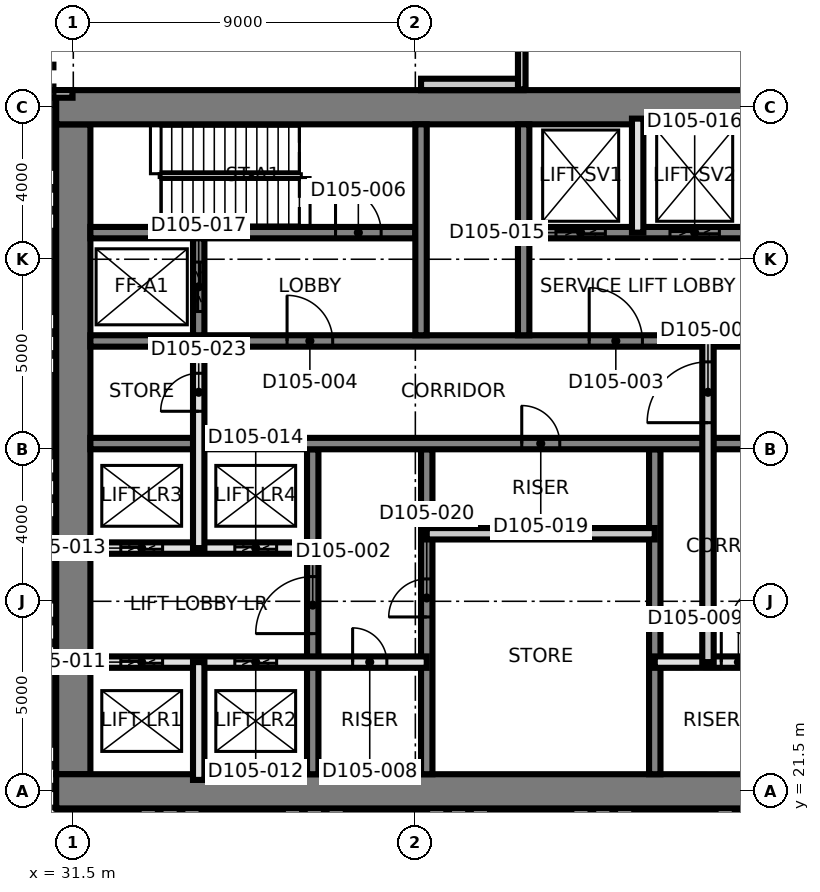
"""IFC4 building model, lengths in metres.
Left out: names, types, materials, properties, quantities, classifications, styles, units other than length and angle.
Written with IfcOpenShell. Run it as: python <this file> out.ifc"""

import sys

from ifc_helpers import new_model, si_unit, direction, frame, frame_2d, origin, place, context, subcontext, project, spatial, rectangle, extrude, element, fill, save


model = new_model("IFC4")
c1 = context("Model", 3, precision=1e-05, world=origin(), true_north=direction((0.0, 1.0)))
c2 = subcontext(c1, "Body", "Model", "MODEL_VIEW")
j1 = project(units=[si_unit("LENGTHUNIT", "METRE"), si_unit("PLANEANGLEUNIT", "RADIAN")], contexts=[c1])
p1 = place(None, origin())
s1 = spatial("IfcSite", under=j1, at=p1, CompositionType="ELEMENT")
p2 = place(p1, origin())
s2 = spatial("IfcBuilding", under=s1, at=p2, CompositionType="ELEMENT")
p3 = place(p2, frame((0.0, 0.0, 18.5)))
s3 = spatial("IfcBuildingStorey", under=s2, at=p3, CompositionType="ELEMENT", Elevation=18.5)
p4 = place(p3, frame((31.5, 21.95, 0.0), z_axis=(0.0, 0.0, 1.0), x_axis=(0.0, 1.0, 0.0)))
e1 = element("IfcWall", 1, at=p4, inside=s3, PredefinedType="SHEAR", context=c2, shape_type="SweptSolid", body=[
    extrude(rectangle(XDim=17.1, YDim=0.9, at=frame_2d((8.55, 0.0))), origin(), (0.0, 0.0, 1.0), 5.0),
])
for number, where, z_axis, x_axis in (
    (2, (31.05, 21.5, 0.0), (0.0, 0.0, 1.0), (1.0, 0.0, 0.0)),
    (3, (31.05, 39.5, 0.0), (0.0, 0.0, 1.0), (1.0, 0.0, 0.0)),
):
    element("IfcWall", number, at=place(p3, frame(where, z_axis=z_axis, x_axis=x_axis)), inside=s3, PredefinedType="SHEAR", context=c2, shape_type="SweptSolid", body=[
        extrude(rectangle(XDim=27.0, YDim=0.9, at=frame_2d((13.5, 0.0))), origin(), (0.0, 0.0, 1.0), 5.0),
    ])
p5 = place(p3, frame((37.8, 21.95, 0.0), z_axis=(0.0, 0.0, 1.0), x_axis=(0.0, 1.0, 0.0)))
e4 = element("IfcWall", 4, at=p5, inside=s3, PredefinedType="SHEAR", context=c2, shape_type="SweptSolid", body=[
    extrude(rectangle(XDim=8.55, YDim=0.3, at=frame_2d((4.275, 0.0))), origin(), (0.0, 0.0, 1.0), 5.0),
])
p6 = place(p5, frame((3.7, 0.0, 0.0)))
e5 = element("IfcOpeningElement", 5, at=p6, cuts=e4, PredefinedType="OPENING", context=c2, shape_type="SweptSolid", body=[
    extrude(rectangle(XDim=1.5, YDim=2.1, at=frame_2d((0.75, 1.05))), frame((0.0, 0.16, 0.0), z_axis=(0.0, -1.0, 0.0), x_axis=(1.0, 0.0, 0.0)), (0.0, 0.0, 1.0), 0.32),
])
p7 = place(p3, frame((40.8, 21.95, 0.0), z_axis=(0.0, 0.0, 1.0), x_axis=(0.0, 1.0, 0.0)))
e6 = element("IfcWall", 6, at=p7, inside=s3, PredefinedType="SHEAR", context=c2, shape_type="SweptSolid", body=[
    extrude(rectangle(XDim=8.55, YDim=0.3, at=frame_2d((4.275, 0.0))), origin(), (0.0, 0.0, 1.0), 5.0),
])
p8 = place(p7, frame((4.138, 0.0, 0.0)))
e7 = element("IfcOpeningElement", 7, at=p8, cuts=e6, PredefinedType="OPENING", context=c2, shape_type="SweptSolid", body=[
    extrude(rectangle(XDim=1.0, YDim=2.1, at=frame_2d((0.5, 1.05))), frame((0.0, 0.16, 0.0), z_axis=(0.0, -1.0, 0.0), x_axis=(1.0, 0.0, 0.0)), (0.0, 0.0, 1.0), 0.32),
])
p9 = place(p3, frame((46.8, 21.95, 0.0), z_axis=(0.0, 0.0, 1.0), x_axis=(0.0, 1.0, 0.0)))
e8 = element("IfcWall", 8, at=p9, inside=s3, PredefinedType="SHEAR", context=c2, shape_type="SweptSolid", body=[
    extrude(rectangle(XDim=8.55, YDim=0.3, at=frame_2d((4.275, 0.0))), origin(), (0.0, 0.0, 1.0), 5.0),
])
p10 = place(p3, frame((31.95, 30.65, 0.0), z_axis=(0.0, 0.0, 1.0), x_axis=(1.0, 0.0, 0.0)))
e9 = element("IfcWall", 9, at=p10, inside=s3, PredefinedType="SHEAR", context=c2, shape_type="SweptSolid", body=[
    extrude(rectangle(XDim=26.1, YDim=0.3, at=frame_2d((13.05, 0.0))), origin(), (0.0, 0.0, 1.0), 5.0),
])
p11 = place(p10, frame((24.55, 0.0, 0.0)))
e10 = element("IfcOpeningElement", 10, at=p11, cuts=e9, PredefinedType="OPENING", context=c2, shape_type="SweptSolid", body=[
    extrude(rectangle(XDim=1.0, YDim=2.1, at=frame_2d((0.5, 1.05))), frame((0.0, 0.16, 0.0), z_axis=(0.0, -1.0, 0.0), x_axis=(1.0, 0.0, 0.0)), (0.0, 0.0, 1.0), 0.32),
])
p12 = place(p10, frame((11.35, 0.0, 0.0)))
e11 = element("IfcOpeningElement", 11, at=p12, cuts=e9, PredefinedType="OPENING", context=c2, shape_type="SweptSolid", body=[
    extrude(rectangle(XDim=1.0, YDim=2.1, at=frame_2d((0.5, 1.05))), frame((0.0, 0.16, 0.0), z_axis=(0.0, -1.0, 0.0), x_axis=(1.0, 0.0, 0.0)), (0.0, 0.0, 1.0), 0.32),
])
p13 = place(p3, frame((31.95, 33.35, 0.0), z_axis=(0.0, 0.0, 1.0), x_axis=(1.0, 0.0, 0.0)))
e12 = element("IfcWall", 12, at=p13, inside=s3, PredefinedType="SHEAR", context=c2, shape_type="SweptSolid", body=[
    extrude(rectangle(XDim=26.1, YDim=0.3, at=frame_2d((13.05, 0.0))), origin(), (0.0, 0.0, 1.0), 5.0),
])
p14 = place(p13, frame((13.125, 0.0, 0.0)))
e13 = element("IfcOpeningElement", 13, at=p14, cuts=e12, PredefinedType="OPENING", context=c2, shape_type="SweptSolid", body=[
    extrude(rectangle(XDim=1.4, YDim=2.1, at=frame_2d((0.7, 1.05))), frame((0.0, 0.16, 0.0), z_axis=(0.0, -1.0, 0.0), x_axis=(1.0, 0.0, 0.0)), (0.0, 0.0, 1.0), 0.32),
])
p15 = place(p13, frame((5.175, 0.0, 0.0)))
e14 = element("IfcOpeningElement", 14, at=p15, cuts=e12, PredefinedType="OPENING", context=c2, shape_type="SweptSolid", body=[
    extrude(rectangle(XDim=1.2, YDim=2.1, at=frame_2d((0.6, 1.05))), frame((0.0, 0.16, 0.0), z_axis=(0.0, -1.0, 0.0), x_axis=(1.0, 0.0, 0.0)), (0.0, 0.0, 1.0), 0.32),
])
p16 = place(p13, frame((19.725, 0.0, 0.0)))
e15 = element("IfcOpeningElement", 15, at=p16, cuts=e12, PredefinedType="OPENING", context=c2, shape_type="SweptSolid", body=[
    extrude(rectangle(XDim=1.2, YDim=2.1, at=frame_2d((0.6, 1.05))), frame((0.0, 0.16, 0.0), z_axis=(0.0, -1.0, 0.0), x_axis=(1.0, 0.0, 0.0)), (0.0, 0.0, 1.0), 0.32),
])
p17 = place(p3, frame((31.95, 36.2, 0.0), z_axis=(0.0, 0.0, 1.0), x_axis=(1.0, 0.0, 0.0)))
e16 = element("IfcWall", 16, at=p17, inside=s3, PredefinedType="SHEAR", context=c2, shape_type="SweptSolid", body=[
    extrude(rectangle(XDim=8.55, YDim=0.3, at=frame_2d((4.275, 0.0))), origin(), (0.0, 0.0, 1.0), 5.0),
])
p18 = place(p17, frame((6.45, 0.0, 0.0)))
e17 = element("IfcOpeningElement", 17, at=p18, cuts=e16, PredefinedType="OPENING", context=c2, shape_type="SweptSolid", body=[
    extrude(rectangle(XDim=1.2, YDim=2.1, at=frame_2d((0.6, 1.05))), frame((0.0, 0.16, 0.0), z_axis=(0.0, -1.0, 0.0), x_axis=(1.0, 0.0, 0.0)), (0.0, 0.0, 1.0), 0.32),
])
p19 = place(p3, frame((43.5, 36.2, 0.0), z_axis=(0.0, 0.0, 1.0), x_axis=(1.0, 0.0, 0.0)))
e18 = element("IfcWall", 18, at=p19, inside=s3, PredefinedType="SHEAR", context=c2, shape_type="SweptSolid", body=[
    extrude(rectangle(XDim=14.55, YDim=0.3, at=frame_2d((7.275, 0.0))), origin(), (0.0, 0.0, 1.0), 5.0),
])
p20 = place(p19, frame((6.9, 0.0, 0.0)))
e19 = element("IfcOpeningElement", 19, at=p20, cuts=e18, PredefinedType="OPENING", context=c2, shape_type="SweptSolid", body=[
    extrude(rectangle(XDim=1.2, YDim=2.1, at=frame_2d((0.6, 1.05))), frame((0.0, 0.16, 0.0), z_axis=(0.0, -1.0, 0.0), x_axis=(1.0, 0.0, 0.0)), (0.0, 0.0, 1.0), 0.32),
])
p21 = place(p19, frame((0.7, 0.0, 0.0)))
e20 = element("IfcOpeningElement", 20, at=p21, cuts=e18, PredefinedType="OPENING", context=c2, shape_type="SweptSolid", body=[
    extrude(rectangle(XDim=1.3, YDim=2.4, at=frame_2d((0.65, 1.2))), frame((0.0, 0.16, 0.0), z_axis=(0.0, -1.0, 0.0), x_axis=(1.0, 0.0, 0.0)), (0.0, 0.0, 1.0), 0.32),
])
p22 = place(p19, frame((3.7, 0.0, 0.0)))
e21 = element("IfcOpeningElement", 21, at=p22, cuts=e18, PredefinedType="OPENING", context=c2, shape_type="SweptSolid", body=[
    extrude(rectangle(XDim=1.3, YDim=2.4, at=frame_2d((0.65, 1.2))), frame((0.0, 0.16, 0.0), z_axis=(0.0, -1.0, 0.0), x_axis=(1.0, 0.0, 0.0)), (0.0, 0.0, 1.0), 0.32),
])
for number, where, z_axis, x_axis in (
    (22, (40.65, 33.5, 0.0), (0.0, 0.0, 1.0), (0.0, 1.0, 0.0)),
    (23, (43.35, 33.5, 0.0), (0.0, 0.0, 1.0), (0.0, 1.0, 0.0)),
):
    element("IfcWall", number, at=place(p3, frame(where, z_axis=z_axis, x_axis=x_axis)), inside=s3, PredefinedType="SHEAR", context=c2, shape_type="SweptSolid", body=[
        extrude(rectangle(XDim=5.55, YDim=0.3, at=frame_2d((2.775, 0.0))), origin(), (0.0, 0.0, 1.0), 5.0),
    ])
p23 = place(p3, frame((34.8, 33.5, 0.0), z_axis=(0.0, 0.0, 1.0), x_axis=(0.0, 1.0, 0.0)))
e24 = element("IfcWall", 24, at=p23, inside=s3, PredefinedType="SHEAR", context=c2, shape_type="SweptSolid", body=[
    extrude(rectangle(XDim=2.55, YDim=0.3, at=frame_2d((1.275, 0.0))), origin(), (0.0, 0.0, 1.0), 5.0),
])
p24 = place(p23, frame((0.625, 0.0, 0.0)))
e25 = element("IfcOpeningElement", 25, at=p24, cuts=e24, PredefinedType="OPENING", context=c2, shape_type="SweptSolid", body=[
    extrude(rectangle(XDim=1.3, YDim=2.4, at=frame_2d((0.65, 1.2))), frame((0.0, 0.16, 0.0), z_axis=(0.0, -1.0, 0.0), x_axis=(1.0, 0.0, 0.0)), (0.0, 0.0, 1.0), 0.32),
])
p25 = place(p3, frame((31.8, 24.9, 0.0), z_axis=(0.0, 0.0, 1.0), x_axis=(1.0, 0.0, 0.0)))
e26 = element("IfcWall", 26, at=p25, inside=s3, PredefinedType="SOLIDWALL", context=c2, shape_type="SweptSolid", body=[
    extrude(rectangle(XDim=9.0, YDim=0.3, at=frame_2d((4.5, 0.0))), origin(), (0.0, 0.0, 1.0), 4.7),
])
p26 = place(p25, frame((7.05, 0.0, 0.0)))
e27 = element("IfcOpeningElement", 27, at=p26, cuts=e26, PredefinedType="OPENING", context=c2, shape_type="SweptSolid", body=[
    extrude(rectangle(XDim=0.9, YDim=2.1, at=frame_2d((0.45, 1.05))), frame((0.0, 0.16, 0.0), z_axis=(0.0, -1.0, 0.0), x_axis=(1.0, 0.0, 0.0)), (0.0, 0.0, 1.0), 0.32),
])
p27 = place(p25, frame((0.95, 0.0, 0.0)))
e28 = element("IfcOpeningElement", 28, at=p27, cuts=e26, PredefinedType="OPENING", context=c2, shape_type="SweptSolid", body=[
    extrude(rectangle(XDim=1.1, YDim=2.4, at=frame_2d((0.55, 1.2))), frame((0.0, 0.16, 0.0), z_axis=(0.0, -1.0, 0.0), x_axis=(1.0, 0.0, 0.0)), (0.0, 0.0, 1.0), 0.32),
])
p28 = place(p25, frame((3.95, 0.0, 0.0)))
e29 = element("IfcOpeningElement", 29, at=p28, cuts=e26, PredefinedType="OPENING", context=c2, shape_type="SweptSolid", body=[
    extrude(rectangle(XDim=1.1, YDim=2.4, at=frame_2d((0.55, 1.2))), frame((0.0, 0.16, 0.0), z_axis=(0.0, -1.0, 0.0), x_axis=(1.0, 0.0, 0.0)), (0.0, 0.0, 1.0), 0.32),
])
p29 = place(p3, frame((46.8, 24.9, 0.0), z_axis=(0.0, 0.0, 1.0), x_axis=(1.0, 0.0, 0.0)))
e30 = element("IfcWall", 30, at=p29, inside=s3, PredefinedType="SOLIDWALL", context=c2, shape_type="SweptSolid", body=[
    extrude(rectangle(XDim=9.0, YDim=0.3, at=frame_2d((4.5, 0.0))), origin(), (0.0, 0.0, 1.0), 4.7),
])
p30 = place(p29, frame((1.75, 0.0, 0.0)))
e31 = element("IfcOpeningElement", 31, at=p30, cuts=e30, PredefinedType="OPENING", context=c2, shape_type="SweptSolid", body=[
    extrude(rectangle(XDim=0.9, YDim=2.1, at=frame_2d((0.45, 1.05))), frame((0.0, 0.16, 0.0), z_axis=(0.0, -1.0, 0.0), x_axis=(1.0, 0.0, 0.0)), (0.0, 0.0, 1.0), 0.32),
])
p31 = place(p3, frame((31.8, 27.9, 0.0), z_axis=(0.0, 0.0, 1.0), x_axis=(1.0, 0.0, 0.0)))
e32 = element("IfcWall", 32, at=p31, inside=s3, PredefinedType="SOLIDWALL", context=c2, shape_type="SweptSolid", body=[
    extrude(rectangle(XDim=6.0, YDim=0.3, at=frame_2d((3.0, 0.0))), origin(), (0.0, 0.0, 1.0), 4.7),
])
p32 = place(p31, frame((0.95, 0.0, 0.0)))
e33 = element("IfcOpeningElement", 33, at=p32, cuts=e32, PredefinedType="OPENING", context=c2, shape_type="SweptSolid", body=[
    extrude(rectangle(XDim=1.1, YDim=2.4, at=frame_2d((0.55, 1.2))), frame((0.0, 0.16, 0.0), z_axis=(0.0, -1.0, 0.0), x_axis=(1.0, 0.0, 0.0)), (0.0, 0.0, 1.0), 0.32),
])
p33 = place(p31, frame((3.95, 0.0, 0.0)))
e34 = element("IfcOpeningElement", 34, at=p33, cuts=e32, PredefinedType="OPENING", context=c2, shape_type="SweptSolid", body=[
    extrude(rectangle(XDim=1.1, YDim=2.4, at=frame_2d((0.55, 1.2))), frame((0.0, 0.16, 0.0), z_axis=(0.0, -1.0, 0.0), x_axis=(1.0, 0.0, 0.0)), (0.0, 0.0, 1.0), 0.32),
])
p34 = place(p3, frame((40.8, 28.277, 0.0), z_axis=(0.0, 0.0, 1.0), x_axis=(1.0, 0.0, 0.0)))
e35 = element("IfcWall", 35, at=p34, inside=s3, PredefinedType="PARTITIONING", context=c2, shape_type="SweptSolid", body=[
    extrude(rectangle(XDim=6.0, YDim=0.3, at=frame_2d((3.0, 0.0))), origin(), (0.0, 0.0, 1.0), 4.7),
])
p35 = place(p3, frame((40.65, 40.1, 0.0), z_axis=(0.0, 0.0, 1.0), x_axis=(1.0, 0.0, 0.0)))
e36 = element("IfcWall", 36, at=p35, inside=s3, PredefinedType="PARTITIONING", context=c2, shape_type="SweptSolid", body=[
    extrude(rectangle(XDim=2.7, YDim=0.3, at=frame_2d((1.35, 0.0))), origin(), (0.0, 0.0, 1.0), 4.7),
])
p36 = place(p3, frame((34.8, 21.8, 0.0), z_axis=(0.0, 0.0, 1.0), x_axis=(0.0, 1.0, 0.0)))
e37 = element("IfcWall", 37, at=p36, inside=s3, PredefinedType="SOLIDWALL", context=c2, shape_type="SweptSolid", body=[
    extrude(rectangle(XDim=3.1, YDim=0.3, at=frame_2d((1.55, 0.0))), origin(), (0.0, 0.0, 1.0), 4.7),
])
p37 = place(p3, frame((34.8, 27.9, 0.0), z_axis=(0.0, 0.0, 1.0), x_axis=(0.0, 1.0, 0.0)))
e38 = element("IfcWall", 38, at=p37, inside=s3, PredefinedType="SOLIDWALL", context=c2, shape_type="SweptSolid", body=[
    extrude(rectangle(XDim=5.45, YDim=0.3, at=frame_2d((2.725, 0.0))), origin(), (0.0, 0.0, 1.0), 4.7),
])
p38 = place(p37, frame((3.6, 0.0, 0.0)))
e39 = element("IfcOpeningElement", 39, at=p38, cuts=e38, PredefinedType="OPENING", context=c2, shape_type="SweptSolid", body=[
    extrude(rectangle(XDim=1.0, YDim=2.1, at=frame_2d((0.5, 1.05))), frame((0.0, 0.16, 0.0), z_axis=(0.0, -1.0, 0.0), x_axis=(1.0, 0.0, 0.0)), (0.0, 0.0, 1.0), 0.32),
])
p39 = place(p3, frame((46.35, 36.2, 0.0), z_axis=(0.0, 0.0, 1.0), x_axis=(0.0, 1.0, 0.0)))
e40 = element("IfcWall", 40, at=p39, inside=s3, PredefinedType="SOLIDWALL", context=c2, shape_type="SweptSolid", body=[
    extrude(rectangle(XDim=3.0, YDim=0.3, at=frame_2d((1.5, 0.0))), origin(), (0.0, 0.0, 1.0), 4.7),
])
p40 = place(p3, frame((48.2, 24.9, 0.0), z_axis=(0.0, 0.0, 1.0), x_axis=(0.0, 1.0, 0.0)))
e41 = element("IfcWall", 41, at=p40, inside=s3, PredefinedType="PARTITIONING", context=c2, shape_type="SweptSolid", body=[
    extrude(rectangle(XDim=8.45, YDim=0.3, at=frame_2d((4.225, 0.0))), origin(), (0.0, 0.0, 1.0), 4.7),
])
p41 = place(p40, frame((6.3, 0.0, 0.0)))
e42 = element("IfcOpeningElement", 42, at=p41, cuts=e41, PredefinedType="OPENING", context=c2, shape_type="SweptSolid", body=[
    extrude(rectangle(XDim=1.6, YDim=2.1, at=frame_2d((0.8, 1.05))), frame((0.0, 0.16, 0.0), z_axis=(0.0, -1.0, 0.0), x_axis=(1.0, 0.0, 0.0)), (0.0, 0.0, 1.0), 0.32),
])
p42 = place(p3, frame((21.07, 39.85, 0.0), z_axis=(0.0, 0.0, 1.0), x_axis=(1.0, 0.0, 0.0)))
e43 = element("IfcWall", 43, at=p42, inside=s3, PredefinedType="PARTITIONING", context=c2, shape_type="SweptSolid", body=[
    extrude(rectangle(XDim=10.41, YDim=0.2, at=frame_2d((5.205, 0.0))), origin(), (0.0, 0.0, 1.0), 4.7),
])
p43 = place(p42, frame((4.257, 0.0, 0.0)))
e44 = element("IfcOpeningElement", 44, at=p43, cuts=e43, PredefinedType="OPENING", context=c2, shape_type="SweptSolid", body=[
    extrude(rectangle(XDim=1.6, YDim=2.1, at=frame_2d((0.8, 1.05))), frame((0.0, 0.11, 0.0), z_axis=(0.0, -1.0, 0.0), x_axis=(1.0, 0.0, 0.0)), (0.0, 0.0, 1.0), 0.22),
])
p44 = place(p3, frame((43.3, 39.97, 0.0), z_axis=(0.0, 0.0, 1.0), x_axis=(0.0, 1.0, 0.0)))
e45 = element("IfcWall", 45, at=p44, inside=s3, PredefinedType="PARTITIONING", context=c2, shape_type="SweptSolid", body=[
    extrude(rectangle(XDim=2.28, YDim=0.2, at=frame_2d((1.14, 0.0))), origin(), (0.0, 0.0, 1.0), 4.7),
])
p45 = place(p41, origin())
e46 = element("IfcDoor", 46, at=p45, inside=s3, OperationType="SINGLE_SWING_LEFT", PredefinedType="DOOR", context=c2, shape_type="SweptSolid", body=[
    extrude(rectangle(XDim=1.6, YDim=2.1, at=frame_2d((0.8, 1.05))), frame((0.0, 0.025, 0.0), z_axis=(0.0, -1.0, 0.0), x_axis=(1.0, 0.0, 0.0)), (0.0, 0.0, 1.0), 0.05),
])
fill(e42, e46)
p46 = place(p6, origin())
e47 = element("IfcDoor", 47, at=p46, inside=s3, OperationType="SINGLE_SWING_LEFT", PredefinedType="DOOR", context=c2, shape_type="SweptSolid", body=[
    extrude(rectangle(XDim=1.5, YDim=2.1, at=frame_2d((0.75, 1.05))), frame((0.0, 0.025, 0.0), z_axis=(0.0, -1.0, 0.0), x_axis=(1.0, 0.0, 0.0)), (0.0, 0.0, 1.0), 0.05),
])
fill(e5, e47)
p47 = place(p14, origin())
e48 = element("IfcDoor", 48, at=p47, inside=s3, OperationType="SINGLE_SWING_RIGHT", PredefinedType="DOOR", context=c2, shape_type="SweptSolid", body=[
    extrude(rectangle(XDim=1.4, YDim=2.1, at=frame_2d((0.7, 1.05))), frame((0.0, 0.025, 0.0), z_axis=(0.0, -1.0, 0.0), x_axis=(1.0, 0.0, 0.0)), (0.0, 0.0, 1.0), 0.05),
])
fill(e13, e48)
p48 = place(p15, origin())
e49 = element("IfcDoor", 49, at=p48, inside=s3, OperationType="SINGLE_SWING_LEFT", PredefinedType="DOOR", context=c2, shape_type="SweptSolid", body=[
    extrude(rectangle(XDim=1.2, YDim=2.1, at=frame_2d((0.6, 1.05))), frame((0.0, 0.025, 0.0), z_axis=(0.0, -1.0, 0.0), x_axis=(1.0, 0.0, 0.0)), (0.0, 0.0, 1.0), 0.05),
])
fill(e14, e49)
p49 = place(p18, origin())
e50 = element("IfcDoor", 50, at=p49, inside=s3, OperationType="SINGLE_SWING_RIGHT", PredefinedType="DOOR", context=c2, shape_type="SweptSolid", body=[
    extrude(rectangle(XDim=1.2, YDim=2.1, at=frame_2d((0.6, 1.05))), frame((0.0, 0.025, 0.0), z_axis=(0.0, -1.0, 0.0), x_axis=(1.0, 0.0, 0.0)), (0.0, 0.0, 1.0), 0.05),
])
fill(e17, e50)
p50 = place(p26, origin())
e51 = element("IfcDoor", 51, at=p50, inside=s3, OperationType="SINGLE_SWING_LEFT", PredefinedType="DOOR", context=c2, shape_type="SweptSolid", body=[
    extrude(rectangle(XDim=0.9, YDim=2.1, at=frame_2d((0.45, 1.05))), frame((0.0, 0.025, 0.0), z_axis=(0.0, -1.0, 0.0), x_axis=(1.0, 0.0, 0.0)), (0.0, 0.0, 1.0), 0.05),
])
fill(e27, e51)
p51 = place(p30, origin())
e52 = element("IfcDoor", 52, at=p51, inside=s3, OperationType="SINGLE_SWING_RIGHT", PredefinedType="DOOR", context=c2, shape_type="SweptSolid", body=[
    extrude(rectangle(XDim=0.9, YDim=2.1, at=frame_2d((0.45, 1.05))), frame((0.0, 0.025, 0.0), z_axis=(0.0, -1.0, 0.0), x_axis=(1.0, 0.0, 0.0)), (0.0, 0.0, 1.0), 0.05),
])
fill(e31, e52)
p52 = place(p27, origin())
e53 = element("IfcDoor", 53, at=p52, inside=s3, OperationType="SLIDING_TO_LEFT", PredefinedType="DOOR", context=c2, shape_type="SweptSolid", body=[
    extrude(rectangle(XDim=1.1, YDim=2.4, at=frame_2d((0.55, 1.2))), frame((0.0, 0.025, 0.0), z_axis=(0.0, -1.0, 0.0), x_axis=(1.0, 0.0, 0.0)), (0.0, 0.0, 1.0), 0.05),
])
fill(e28, e53)
p53 = place(p28, origin())
e54 = element("IfcDoor", 54, at=p53, inside=s3, OperationType="SLIDING_TO_LEFT", PredefinedType="DOOR", context=c2, shape_type="SweptSolid", body=[
    extrude(rectangle(XDim=1.1, YDim=2.4, at=frame_2d((0.55, 1.2))), frame((0.0, 0.025, 0.0), z_axis=(0.0, -1.0, 0.0), x_axis=(1.0, 0.0, 0.0)), (0.0, 0.0, 1.0), 0.05),
])
fill(e29, e54)
p54 = place(p32, origin())
e55 = element("IfcDoor", 55, at=p54, inside=s3, OperationType="SLIDING_TO_LEFT", PredefinedType="DOOR", context=c2, shape_type="SweptSolid", body=[
    extrude(rectangle(XDim=1.1, YDim=2.4, at=frame_2d((0.55, 1.2))), frame((0.0, 0.025, 0.0), z_axis=(0.0, -1.0, 0.0), x_axis=(1.0, 0.0, 0.0)), (0.0, 0.0, 1.0), 0.05),
])
fill(e33, e55)
p55 = place(p33, origin())
e56 = element("IfcDoor", 56, at=p55, inside=s3, OperationType="SLIDING_TO_LEFT", PredefinedType="DOOR", context=c2, shape_type="SweptSolid", body=[
    extrude(rectangle(XDim=1.1, YDim=2.4, at=frame_2d((0.55, 1.2))), frame((0.0, 0.025, 0.0), z_axis=(0.0, -1.0, 0.0), x_axis=(1.0, 0.0, 0.0)), (0.0, 0.0, 1.0), 0.05),
])
fill(e34, e56)
p56 = place(p21, origin())
e57 = element("IfcDoor", 57, at=p56, inside=s3, OperationType="SLIDING_TO_LEFT", PredefinedType="DOOR", context=c2, shape_type="SweptSolid", body=[
    extrude(rectangle(XDim=1.3, YDim=2.4, at=frame_2d((0.65, 1.2))), frame((0.0, 0.025, 0.0), z_axis=(0.0, -1.0, 0.0), x_axis=(1.0, 0.0, 0.0)), (0.0, 0.0, 1.0), 0.05),
])
fill(e20, e57)
p57 = place(p22, origin())
e58 = element("IfcDoor", 58, at=p57, inside=s3, OperationType="SLIDING_TO_LEFT", PredefinedType="DOOR", context=c2, shape_type="SweptSolid", body=[
    extrude(rectangle(XDim=1.3, YDim=2.4, at=frame_2d((0.65, 1.2))), frame((0.0, 0.025, 0.0), z_axis=(0.0, -1.0, 0.0), x_axis=(1.0, 0.0, 0.0)), (0.0, 0.0, 1.0), 0.05),
])
fill(e21, e58)
p58 = place(p24, origin())
e59 = element("IfcDoor", 59, at=p58, inside=s3, OperationType="SLIDING_TO_LEFT", PredefinedType="DOOR", context=c2, shape_type="SweptSolid", body=[
    extrude(rectangle(XDim=1.3, YDim=2.4, at=frame_2d((0.65, 1.2))), frame((0.0, 0.025, 0.0), z_axis=(0.0, -1.0, 0.0), x_axis=(1.0, 0.0, 0.0)), (0.0, 0.0, 1.0), 0.05),
])
fill(e25, e59)
p59 = place(p12, origin())
e60 = element("IfcDoor", 60, at=p59, inside=s3, OperationType="SINGLE_SWING_LEFT", PredefinedType="DOOR", context=c2, shape_type="SweptSolid", body=[
    extrude(rectangle(XDim=1.0, YDim=2.1, at=frame_2d((0.5, 1.05))), frame((0.0, 0.025, 0.0), z_axis=(0.0, -1.0, 0.0), x_axis=(1.0, 0.0, 0.0)), (0.0, 0.0, 1.0), 0.05),
])
fill(e11, e60)
p60 = place(p8, origin())
e61 = element("IfcDoor", 61, at=p60, inside=s3, OperationType="SINGLE_SWING_RIGHT", PredefinedType="DOOR", context=c2, shape_type="SweptSolid", body=[
    extrude(rectangle(XDim=1.0, YDim=2.1, at=frame_2d((0.5, 1.05))), frame((0.0, 0.025, 0.0), z_axis=(0.0, -1.0, 0.0), x_axis=(1.0, 0.0, 0.0)), (0.0, 0.0, 1.0), 0.05),
])
fill(e7, e61)
p61 = place(p38, origin())
e62 = element("IfcDoor", 62, at=p61, inside=s3, OperationType="SINGLE_SWING_LEFT", PredefinedType="DOOR", context=c2, shape_type="SweptSolid", body=[
    extrude(rectangle(XDim=1.0, YDim=2.1, at=frame_2d((0.5, 1.05))), frame((0.0, 0.025, 0.0), z_axis=(0.0, -1.0, 0.0), x_axis=(1.0, 0.0, 0.0)), (0.0, 0.0, 1.0), 0.05),
])
fill(e39, e62)
save(model, sys.argv[1])
